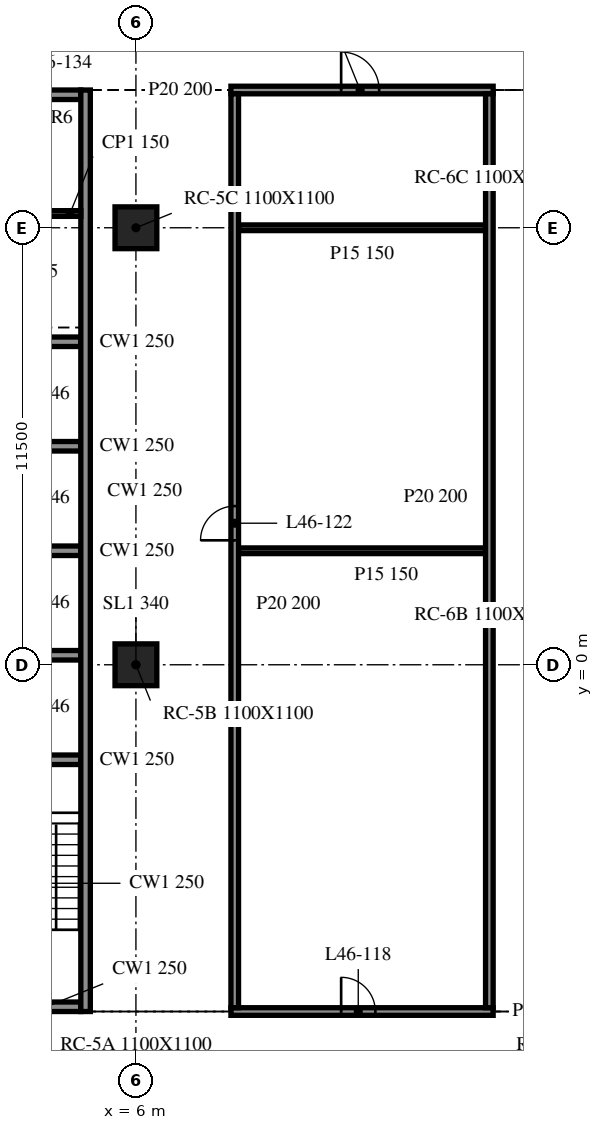
"""IFC4 building model, lengths in metres.
Left out: names, types, materials, properties, quantities, classifications, styles, units other than length and angle.
Written with IfcOpenShell. Run it as: python <this file> out.ifc"""

import sys

from ifc_helpers import new_model, si_unit, direction, frame, frame_2d, origin, origin_2d, place, context, subcontext, project, spatial, rectangle, extrude, element, fill, save


model = new_model("IFC4")
c1 = context("Model", 3, precision=1e-05, world=origin(), true_north=direction((0.0, 1.0)))
c2 = subcontext(c1, "Body", "Model", "MODEL_VIEW")
j1 = project(units=[si_unit("LENGTHUNIT", "METRE"), si_unit("PLANEANGLEUNIT", "RADIAN")], contexts=[c1])
p1 = place(None, origin())
s1 = spatial("IfcSite", under=j1, at=p1, CompositionType="ELEMENT")
p2 = place(p1, origin())
s2 = spatial("IfcBuilding", under=s1, at=p2, CompositionType="ELEMENT")
p3 = place(p2, frame((0.0, 0.0, 193.9)))
s3 = spatial("IfcBuildingStorey", under=s2, at=p3, CompositionType="ELEMENT", Elevation=193.9)
for number, where, z_axis, x_axis in (
    (1, (6.0, 0.0, -0.34), (0.0, 0.0, 1.0), (1.0, 0.0, 0.0)),
    (2, (6.0, 11.5, -0.34), (0.0, 0.0, 1.0), (1.0, 0.0, 0.0)),
):
    element("IfcColumn", number, at=place(p3, frame(where, z_axis=z_axis, x_axis=x_axis)), inside=s3, PredefinedType="COLUMN", context=c2, shape_type="SweptSolid", body=[
        extrude(rectangle(XDim=1.1, YDim=1.1, at=origin_2d()), origin(), (0.0, 0.0, 1.0), 3.8),
    ])
p4 = place(p3, frame((4.675, -9.125, 0.0), z_axis=(0.0, 0.0, 1.0), x_axis=(0.0, 1.0, 0.0)))
e3 = element("IfcWall", 3, at=p4, inside=s3, PredefinedType="SOLIDWALL", context=c2, shape_type="SweptSolid", body=[
    extrude(rectangle(XDim=24.25, YDim=0.25, at=frame_2d((12.125, 0.0))), origin(), (0.0, 0.0, 1.0), 3.46),
])
p5 = place(p3, frame((4.55, -9.0, 0.0), z_axis=(0.0, 0.0, 1.0), x_axis=(-1.0, 0.0, 0.0)))
e4 = element("IfcWall", 4, at=p5, inside=s3, PredefinedType="SOLIDWALL", context=c2, shape_type="SweptSolid", body=[
    extrude(rectangle(XDim=9.1, YDim=0.25, at=frame_2d((4.55, 0.0))), origin(), (0.0, 0.0, 1.0), 3.46),
])
p6 = place(p5, frame((3.65, 0.0, 0.0)))
e5 = element("IfcOpeningElement", 5, at=p6, cuts=e4, PredefinedType="OPENING", context=c2, shape_type="SweptSolid", body=[
    extrude(rectangle(XDim=1.8, YDim=2.1, at=frame_2d((0.9, 1.05))), frame((0.0, 0.135, 0.0), z_axis=(0.0, -1.0, 0.0), x_axis=(1.0, 0.0, 0.0)), (0.0, 0.0, 1.0), 0.27),
])
p7 = place(p3, frame((-4.55, 15.0, 0.0), z_axis=(0.0, 0.0, 1.0), x_axis=(1.0, 0.0, 0.0)))
e6 = element("IfcWall", 6, at=p7, inside=s3, PredefinedType="SOLIDWALL", context=c2, shape_type="SweptSolid", body=[
    extrude(rectangle(XDim=9.1, YDim=0.25, at=frame_2d((4.55, 0.0))), origin(), (0.0, 0.0, 1.0), 3.46),
])
p8 = place(p7, frame((3.65, 0.0, 0.0)))
e7 = element("IfcOpeningElement", 7, at=p8, cuts=e6, PredefinedType="OPENING", context=c2, shape_type="SweptSolid", body=[
    extrude(rectangle(XDim=1.8, YDim=2.1, at=frame_2d((0.9, 1.05))), frame((0.0, 0.135, 0.0), z_axis=(0.0, -1.0, 0.0), x_axis=(1.0, 0.0, 0.0)), (0.0, 0.0, 1.0), 0.27),
])
for number, where, z_axis, x_axis in (
    (8, (1.7, -2.5, 0.0), (0.0, 0.0, 1.0), (1.0, 0.0, 0.0)),
    (9, (1.7, 0.25, 0.0), (0.0, 0.0, 1.0), (1.0, 0.0, 0.0)),
    (10, (1.7, 3.0, 0.0), (0.0, 0.0, 1.0), (1.0, 0.0, 0.0)),
    (11, (1.7, 5.75, 0.0), (0.0, 0.0, 1.0), (1.0, 0.0, 0.0)),
    (12, (1.7, 8.5, 0.0), (0.0, 0.0, 1.0), (1.0, 0.0, 0.0)),
):
    element("IfcWall", number, at=place(p3, frame(where, z_axis=z_axis, x_axis=x_axis)), inside=s3, PredefinedType="SOLIDWALL", context=c2, shape_type="SweptSolid", body=[
        extrude(rectangle(XDim=2.85, YDim=0.25, at=frame_2d((1.425, 0.0))), origin(), (0.0, 0.0, 1.0), 3.46),
    ])
p9 = place(p3, frame((1.7, 11.875, 0.0), z_axis=(0.0, 0.0, 1.0), x_axis=(1.0, 0.0, 0.0)))
e13 = element("IfcWall", 13, at=p9, inside=s3, PredefinedType="PARTITIONING", context=c2, shape_type="SweptSolid", body=[
    extrude(rectangle(XDim=2.85, YDim=0.15, at=frame_2d((1.425, 0.0))), origin(), (0.0, 0.0, 1.0), 3.46),
])
p10 = place(p3, frame((8.5, -9.125, 0.0), z_axis=(0.0, 0.0, 1.0), x_axis=(1.0, 0.0, 0.0)))
e14 = element("IfcWall", 14, at=p10, inside=s3, PredefinedType="PARTITIONING", context=c2, shape_type="SweptSolid", body=[
    extrude(rectangle(XDim=6.9, YDim=0.2, at=frame_2d((3.45, 0.0))), origin(), (0.0, 0.0, 1.0), 3.46),
])
p11 = place(p10, frame((2.9, 0.0, 0.0)))
e15 = element("IfcOpeningElement", 15, at=p11, cuts=e14, PredefinedType="OPENING", context=c2, shape_type="SweptSolid", body=[
    extrude(rectangle(XDim=0.9, YDim=2.1, at=frame_2d((0.45, 1.05))), frame((0.0, 0.11, 0.0), z_axis=(0.0, -1.0, 0.0), x_axis=(1.0, 0.0, 0.0)), (0.0, 0.0, 1.0), 0.22),
])
for number, where, z_axis, x_axis in (
    (16, (8.7, 3.0, 0.0), (0.0, 0.0, 1.0), (1.0, 0.0, 0.0)),
    (17, (8.7, 11.5, 0.0), (0.0, 0.0, 1.0), (1.0, 0.0, 0.0)),
):
    element("IfcWall", number, at=place(p3, frame(where, z_axis=z_axis, x_axis=x_axis)), inside=s3, PredefinedType="PARTITIONING", context=c2, shape_type="SweptSolid", body=[
        extrude(rectangle(XDim=6.5, YDim=0.15, at=frame_2d((3.25, 0.0))), origin(), (0.0, 0.0, 1.0), 3.46),
    ])
p12 = place(p3, frame((8.5, 15.125, 0.0), z_axis=(0.0, 0.0, 1.0), x_axis=(1.0, 0.0, 0.0)))
e18 = element("IfcWall", 18, at=p12, inside=s3, PredefinedType="PARTITIONING", context=c2, shape_type="SweptSolid", body=[
    extrude(rectangle(XDim=6.9, YDim=0.2, at=frame_2d((3.45, 0.0))), origin(), (0.0, 0.0, 1.0), 3.46),
])
p13 = place(p12, frame((2.9, 0.0, 0.0)))
e19 = element("IfcOpeningElement", 19, at=p13, cuts=e18, PredefinedType="OPENING", context=c2, shape_type="SweptSolid", body=[
    extrude(rectangle(XDim=1.0, YDim=2.1, at=frame_2d((0.5, 1.05))), frame((0.0, 0.11, 0.0), z_axis=(0.0, -1.0, 0.0), x_axis=(1.0, 0.0, 0.0)), (0.0, 0.0, 1.0), 0.22),
])
p14 = place(p3, frame((8.6, -9.025, 0.0), z_axis=(0.0, 0.0, 1.0), x_axis=(0.0, 1.0, 0.0)))
e20 = element("IfcWall", 20, at=p14, inside=s3, PredefinedType="PARTITIONING", context=c2, shape_type="SweptSolid", body=[
    extrude(rectangle(XDim=24.05, YDim=0.2, at=frame_2d((12.025, 0.0))), origin(), (0.0, 0.0, 1.0), 3.46),
])
p15 = place(p14, frame((12.3, 0.0, 0.0)))
e21 = element("IfcOpeningElement", 21, at=p15, cuts=e20, PredefinedType="OPENING", context=c2, shape_type="SweptSolid", body=[
    extrude(rectangle(XDim=0.9, YDim=2.1, at=frame_2d((0.45, 1.05))), frame((0.0, 0.11, 0.0), z_axis=(0.0, -1.0, 0.0), x_axis=(1.0, 0.0, 0.0)), (0.0, 0.0, 1.0), 0.22),
])
p16 = place(p3, frame((15.3, -9.025, 0.0), z_axis=(0.0, 0.0, 1.0), x_axis=(0.0, 1.0, 0.0)))
e22 = element("IfcWall", 22, at=p16, inside=s3, PredefinedType="PARTITIONING", context=c2, shape_type="SweptSolid", body=[
    extrude(rectangle(XDim=24.05, YDim=0.2, at=frame_2d((12.025, 0.0))), origin(), (0.0, 0.0, 1.0), 3.46),
])
p17 = place(p11, origin())
e23 = element("IfcDoor", 23, at=p17, inside=s3, OperationType="SINGLE_SWING_LEFT", PredefinedType="DOOR", context=c2, shape_type="SweptSolid", body=[
    extrude(rectangle(XDim=0.9, YDim=2.1, at=frame_2d((0.45, 1.05))), frame((0.0, 0.025, 0.0), z_axis=(0.0, -1.0, 0.0), x_axis=(1.0, 0.0, 0.0)), (0.0, 0.0, 1.0), 0.05),
])
fill(e15, e23)
p18 = place(p15, origin())
e24 = element("IfcDoor", 24, at=p18, inside=s3, OperationType="SINGLE_SWING_LEFT", PredefinedType="DOOR", context=c2, shape_type="SweptSolid", body=[
    extrude(rectangle(XDim=0.9, YDim=2.1, at=frame_2d((0.45, 1.05))), frame((0.0, 0.025, 0.0), z_axis=(0.0, -1.0, 0.0), x_axis=(1.0, 0.0, 0.0)), (0.0, 0.0, 1.0), 0.05),
])
fill(e21, e24)
p19 = place(p13, origin())
e25 = element("IfcDoor", 25, at=p19, inside=s3, OperationType="SINGLE_SWING_RIGHT", PredefinedType="DOOR", context=c2, shape_type="SweptSolid", body=[
    extrude(rectangle(XDim=1.0, YDim=2.1, at=frame_2d((0.5, 1.05))), frame((0.0, 0.025, 0.0), z_axis=(0.0, -1.0, 0.0), x_axis=(1.0, 0.0, 0.0)), (0.0, 0.0, 1.0), 0.05),
])
fill(e19, e25)
save(model, sys.argv[1])
